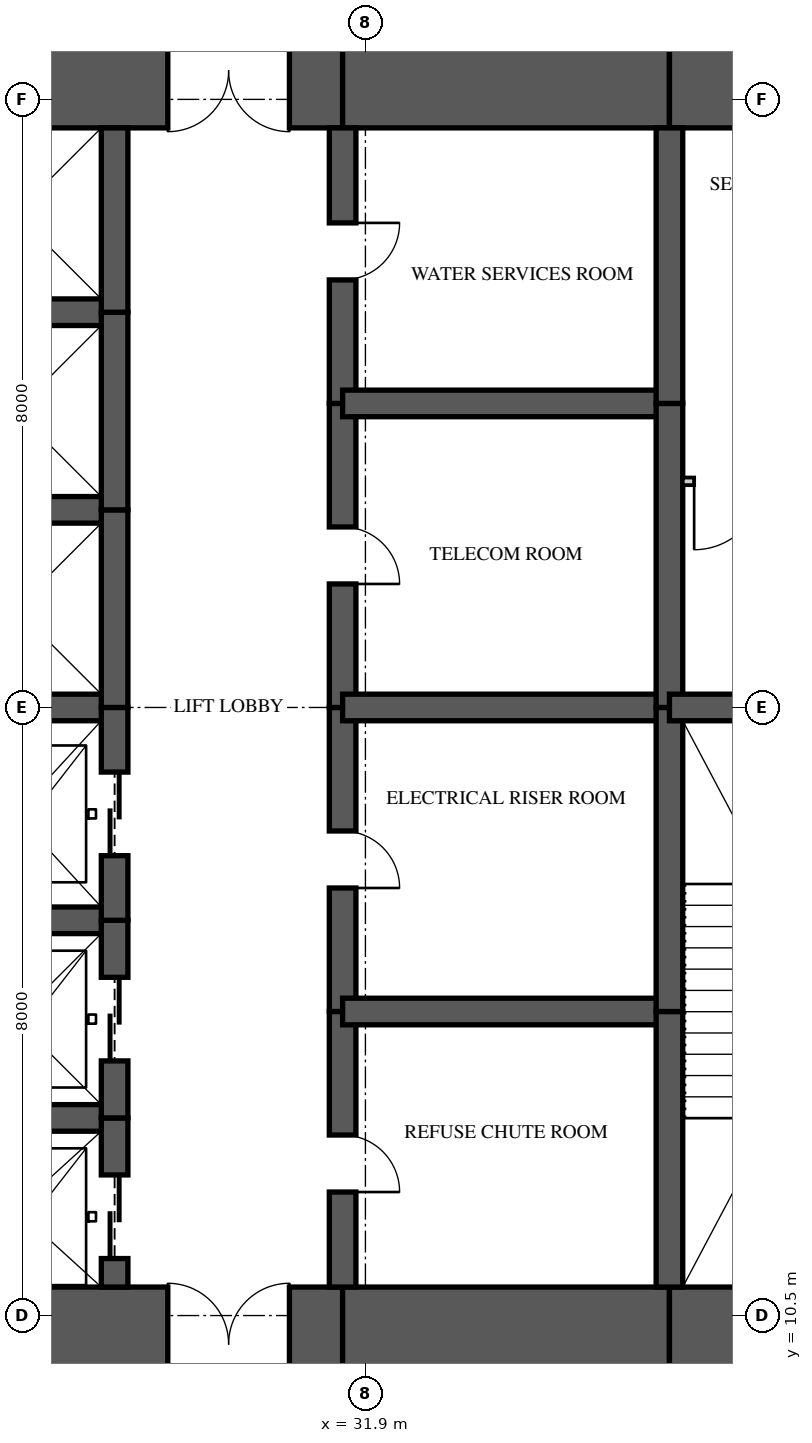
"""IFC4 building model, lengths in metres.
Left out: names, types, materials, properties, quantities, classifications, styles, units other than length and angle.
Written with IfcOpenShell. Run it as: python <this file> out.ifc"""

import sys

from ifc_helpers import new_model, si_unit, direction, frame, frame_2d, origin, place, context, subcontext, project, spatial, rectangle, extrude, element, fill, save


model = new_model("IFC4")
c1 = context("Model", 3, precision=1e-05, world=origin(), true_north=direction((0.0, 1.0)))
c2 = subcontext(c1, "Body", "Model", "MODEL_VIEW")
j1 = project(units=[si_unit("LENGTHUNIT", "METRE"), si_unit("PLANEANGLEUNIT", "RADIAN")], contexts=[c1])
p1 = place(None, origin())
s1 = spatial("IfcSite", under=j1, at=p1, CompositionType="ELEMENT")
p2 = place(p1, origin())
s2 = spatial("IfcBuilding", under=s1, at=p2, CompositionType="ELEMENT")
p3 = place(p2, frame((0.0, 0.0, 111.55)))
s3 = spatial("IfcBuildingStorey", under=s2, at=p3, CompositionType="ELEMENT", Elevation=111.55)
p4 = place(p3, frame((26.0, 10.125, 0.0), z_axis=(0.0, 0.0, 1.0), x_axis=(1.0, 0.0, 0.0)))
e1 = element("IfcWall", 1, at=p4, inside=s3, PredefinedType="SHEAR", context=c2, shape_type="SweptSolid", body=[
    extrude(rectangle(XDim=5.6, YDim=1.5, at=frame_2d((2.8, 0.0))), origin(), (0.0, 0.0, 1.0), 3.35),
])
p5 = place(p4, frame((3.3, 0.0, 0.0)))
e2 = element("IfcOpeningElement", 2, at=p5, cuts=e1, PredefinedType="OPENING", context=c2, shape_type="SweptSolid", body=[
    extrude(rectangle(XDim=1.6, YDim=2.1, at=frame_2d((0.8, 1.05))), frame((0.0, 0.76, 0.0), z_axis=(0.0, -1.0, 0.0), x_axis=(1.0, 0.0, 0.0)), (0.0, 0.0, 1.0), 1.52),
])
p6 = place(p3, frame((31.6, 10.125, 0.0), z_axis=(0.0, 0.0, 1.0), x_axis=(1.0, 0.0, 0.0)))
e3 = element("IfcWall", 3, at=p6, inside=s3, PredefinedType="SHEAR", context=c2, shape_type="SweptSolid", body=[
    extrude(rectangle(XDim=4.3, YDim=1.5, at=frame_2d((2.15, 0.0))), origin(), (0.0, 0.0, 1.0), 3.35),
])
p7 = place(p3, frame((35.9, 10.125, 0.0), z_axis=(0.0, 0.0, 1.0), x_axis=(1.0, 0.0, 0.0)))
e4 = element("IfcWall", 4, at=p7, inside=s3, PredefinedType="SHEAR", context=c2, shape_type="SweptSolid", body=[
    extrude(rectangle(XDim=8.325, YDim=1.5, at=frame_2d((4.163, 0.0))), origin(), (0.0, 0.0, 1.0), 3.35),
])
p8 = place(p7, frame((2.7, 0.0, 0.0)))
e5 = element("IfcOpeningElement", 5, at=p8, cuts=e4, PredefinedType="OPENING", context=c2, shape_type="SweptSolid", body=[
    extrude(rectangle(XDim=1.0, YDim=2.1, at=frame_2d((0.5, 1.05))), frame((0.0, 0.76, 0.0), z_axis=(0.0, -1.0, 0.0), x_axis=(1.0, 0.0, 0.0)), (0.0, 0.0, 1.0), 1.52),
])
p9 = place(p3, frame((44.225, 26.875, 0.0), z_axis=(0.0, 0.0, 1.0), x_axis=(-1.0, 0.0, 0.0)))
e6 = element("IfcWall", 6, at=p9, inside=s3, PredefinedType="SHEAR", context=c2, shape_type="SweptSolid", body=[
    extrude(rectangle(XDim=8.325, YDim=1.5, at=frame_2d((4.163, 0.0))), origin(), (0.0, 0.0, 1.0), 3.35),
])
p10 = place(p9, frame((5.725, 0.0, 0.0)))
e7 = element("IfcOpeningElement", 7, at=p10, cuts=e6, PredefinedType="OPENING", context=c2, shape_type="SweptSolid", body=[
    extrude(rectangle(XDim=0.9, YDim=2.1, at=frame_2d((0.45, 1.05))), frame((0.0, 0.76, 0.0), z_axis=(0.0, -1.0, 0.0), x_axis=(1.0, 0.0, 0.0)), (0.0, 0.0, 1.0), 1.52),
])
p11 = place(p3, frame((35.9, 26.875, 0.0), z_axis=(0.0, 0.0, 1.0), x_axis=(-1.0, 0.0, 0.0)))
e8 = element("IfcWall", 8, at=p11, inside=s3, PredefinedType="SHEAR", context=c2, shape_type="SweptSolid", body=[
    extrude(rectangle(XDim=4.3, YDim=1.5, at=frame_2d((2.15, 0.0))), origin(), (0.0, 0.0, 1.0), 3.35),
])
p12 = place(p3, frame((31.6, 26.875, 0.0), z_axis=(0.0, 0.0, 1.0), x_axis=(-1.0, 0.0, 0.0)))
e9 = element("IfcWall", 9, at=p12, inside=s3, PredefinedType="SHEAR", context=c2, shape_type="SweptSolid", body=[
    extrude(rectangle(XDim=5.6, YDim=1.5, at=frame_2d((2.8, 0.0))), origin(), (0.0, 0.0, 1.0), 3.35),
])
p13 = place(p12, frame((0.7, 0.0, 0.0)))
e10 = element("IfcOpeningElement", 10, at=p13, cuts=e9, PredefinedType="OPENING", context=c2, shape_type="SweptSolid", body=[
    extrude(rectangle(XDim=1.6, YDim=2.1, at=frame_2d((0.8, 1.05))), frame((0.0, 0.76, 0.0), z_axis=(0.0, -1.0, 0.0), x_axis=(1.0, 0.0, 0.0)), (0.0, 0.0, 1.0), 1.52),
])
p14 = place(p3, frame((28.6, 10.875, 0.0), z_axis=(0.0, 0.0, 1.0), x_axis=(0.0, 1.0, 0.0)))
e11 = element("IfcWall", 11, at=p14, inside=s3, PredefinedType="SHEAR", context=c2, shape_type="SweptSolid", body=[
    extrude(rectangle(XDim=2.225, YDim=0.35, at=frame_2d((1.113, 0.0))), origin(), (0.0, 0.0, 1.0), 3.35),
])
p15 = place(p14, frame((0.375, 0.0, 0.0)))
e12 = element("IfcOpeningElement", 12, at=p15, cuts=e11, PredefinedType="OPENING", context=c2, shape_type="SweptSolid", body=[
    extrude(rectangle(XDim=1.1, YDim=2.1, at=frame_2d((0.55, 1.05))), frame((0.0, 0.185, 0.0), z_axis=(0.0, -1.0, 0.0), x_axis=(1.0, 0.0, 0.0)), (0.0, 0.0, 1.0), 0.37),
])
p16 = place(p3, frame((28.6, 13.1, 0.0), z_axis=(0.0, 0.0, 1.0), x_axis=(0.0, 1.0, 0.0)))
e13 = element("IfcWall", 13, at=p16, inside=s3, PredefinedType="SHEAR", context=c2, shape_type="SweptSolid", body=[
    extrude(rectangle(XDim=2.6, YDim=0.35, at=frame_2d((1.3, 0.0))), origin(), (0.0, 0.0, 1.0), 3.35),
])
p17 = place(p16, frame((0.75, 0.0, 0.0)))
e14 = element("IfcOpeningElement", 14, at=p17, cuts=e13, PredefinedType="OPENING", context=c2, shape_type="SweptSolid", body=[
    extrude(rectangle(XDim=1.1, YDim=2.1, at=frame_2d((0.55, 1.05))), frame((0.0, 0.185, 0.0), z_axis=(0.0, -1.0, 0.0), x_axis=(1.0, 0.0, 0.0)), (0.0, 0.0, 1.0), 0.37),
])
p18 = place(p3, frame((28.6, 15.7, 0.0), z_axis=(0.0, 0.0, 1.0), x_axis=(0.0, 1.0, 0.0)))
e15 = element("IfcWall", 15, at=p18, inside=s3, PredefinedType="SHEAR", context=c2, shape_type="SweptSolid", body=[
    extrude(rectangle(XDim=2.8, YDim=0.35, at=frame_2d((1.4, 0.0))), origin(), (0.0, 0.0, 1.0), 3.35),
])
p19 = place(p18, frame((0.85, 0.0, 0.0)))
e16 = element("IfcOpeningElement", 16, at=p19, cuts=e15, PredefinedType="OPENING", context=c2, shape_type="SweptSolid", body=[
    extrude(rectangle(XDim=1.1, YDim=2.1, at=frame_2d((0.55, 1.05))), frame((0.0, 0.185, 0.0), z_axis=(0.0, -1.0, 0.0), x_axis=(1.0, 0.0, 0.0)), (0.0, 0.0, 1.0), 0.37),
])
p20 = place(p3, frame((28.6, 18.5, 0.0), z_axis=(0.0, 0.0, 1.0), x_axis=(0.0, 1.0, 0.0)))
e17 = element("IfcWall", 17, at=p20, inside=s3, PredefinedType="SHEAR", context=c2, shape_type="SweptSolid", body=[
    extrude(rectangle(XDim=2.6, YDim=0.35, at=frame_2d((1.3, 0.0))), origin(), (0.0, 0.0, 1.0), 3.35),
])
p21 = place(p3, frame((28.6, 21.1, 0.0), z_axis=(0.0, 0.0, 1.0), x_axis=(0.0, 1.0, 0.0)))
e18 = element("IfcWall", 18, at=p21, inside=s3, PredefinedType="SHEAR", context=c2, shape_type="SweptSolid", body=[
    extrude(rectangle(XDim=2.6, YDim=0.35, at=frame_2d((1.3, 0.0))), origin(), (0.0, 0.0, 1.0), 3.35),
])
p22 = place(p3, frame((28.6, 23.7, 0.0), z_axis=(0.0, 0.0, 1.0), x_axis=(0.0, 1.0, 0.0)))
e19 = element("IfcWall", 19, at=p22, inside=s3, PredefinedType="SHEAR", context=c2, shape_type="SweptSolid", body=[
    extrude(rectangle(XDim=2.425, YDim=0.35, at=frame_2d((1.212, 0.0))), origin(), (0.0, 0.0, 1.0), 3.35),
])
p23 = place(p3, frame((31.6, 10.875, 0.0), z_axis=(0.0, 0.0, 1.0), x_axis=(0.0, 1.0, 0.0)))
e20 = element("IfcWall", 20, at=p23, inside=s3, PredefinedType="SHEAR", context=c2, shape_type="SweptSolid", body=[
    extrude(rectangle(XDim=3.625, YDim=0.35, at=frame_2d((1.812, 0.0))), origin(), (0.0, 0.0, 1.0), 3.35),
])
p24 = place(p23, frame((1.25, 0.0, 0.0)))
e21 = element("IfcOpeningElement", 21, at=p24, cuts=e20, PredefinedType="OPENING", context=c2, shape_type="SweptSolid", body=[
    extrude(rectangle(XDim=0.75, YDim=2.1, at=frame_2d((0.375, 1.05))), frame((0.0, 0.185, 0.0), z_axis=(0.0, -1.0, 0.0), x_axis=(1.0, 0.0, 0.0)), (0.0, 0.0, 1.0), 0.37),
])
p25 = place(p3, frame((31.6, 14.5, 0.0), z_axis=(0.0, 0.0, 1.0), x_axis=(0.0, 1.0, 0.0)))
e22 = element("IfcWall", 22, at=p25, inside=s3, PredefinedType="SHEAR", context=c2, shape_type="SweptSolid", body=[
    extrude(rectangle(XDim=4.0, YDim=0.35, at=frame_2d((2.0, 0.0))), origin(), (0.0, 0.0, 1.0), 3.35),
])
p26 = place(p25, frame((1.625, 0.0, 0.0)))
e23 = element("IfcOpeningElement", 23, at=p26, cuts=e22, PredefinedType="OPENING", context=c2, shape_type="SweptSolid", body=[
    extrude(rectangle(XDim=0.75, YDim=2.1, at=frame_2d((0.375, 1.05))), frame((0.0, 0.185, 0.0), z_axis=(0.0, -1.0, 0.0), x_axis=(1.0, 0.0, 0.0)), (0.0, 0.0, 1.0), 0.37),
])
p27 = place(p3, frame((31.6, 18.5, 0.0), z_axis=(0.0, 0.0, 1.0), x_axis=(0.0, 1.0, 0.0)))
e24 = element("IfcWall", 24, at=p27, inside=s3, PredefinedType="SHEAR", context=c2, shape_type="SweptSolid", body=[
    extrude(rectangle(XDim=4.0, YDim=0.35, at=frame_2d((2.0, 0.0))), origin(), (0.0, 0.0, 1.0), 3.35),
])
p28 = place(p27, frame((1.625, 0.0, 0.0)))
e25 = element("IfcOpeningElement", 25, at=p28, cuts=e24, PredefinedType="OPENING", context=c2, shape_type="SweptSolid", body=[
    extrude(rectangle(XDim=0.75, YDim=2.1, at=frame_2d((0.375, 1.05))), frame((0.0, 0.185, 0.0), z_axis=(0.0, -1.0, 0.0), x_axis=(1.0, 0.0, 0.0)), (0.0, 0.0, 1.0), 0.37),
])
p29 = place(p3, frame((31.6, 22.5, 0.0), z_axis=(0.0, 0.0, 1.0), x_axis=(0.0, 1.0, 0.0)))
e26 = element("IfcWall", 26, at=p29, inside=s3, PredefinedType="SHEAR", context=c2, shape_type="SweptSolid", body=[
    extrude(rectangle(XDim=3.625, YDim=0.35, at=frame_2d((1.812, 0.0))), origin(), (0.0, 0.0, 1.0), 3.35),
])
p30 = place(p29, frame((1.625, 0.0, 0.0)))
e27 = element("IfcOpeningElement", 27, at=p30, cuts=e26, PredefinedType="OPENING", context=c2, shape_type="SweptSolid", body=[
    extrude(rectangle(XDim=0.75, YDim=2.1, at=frame_2d((0.375, 1.05))), frame((0.0, 0.185, 0.0), z_axis=(0.0, -1.0, 0.0), x_axis=(1.0, 0.0, 0.0)), (0.0, 0.0, 1.0), 0.37),
])
p31 = place(p3, frame((35.9, 10.875, 0.0), z_axis=(0.0, 0.0, 1.0), x_axis=(0.0, 1.0, 0.0)))
e28 = element("IfcWall", 28, at=p31, inside=s3, PredefinedType="SHEAR", context=c2, shape_type="SweptSolid", body=[
    extrude(rectangle(XDim=3.625, YDim=0.35, at=frame_2d((1.812, 0.0))), origin(), (0.0, 0.0, 1.0), 3.35),
])
for number, where, z_axis, x_axis in (
    (29, (35.9, 14.5, 0.0), (0.0, 0.0, 1.0), (0.0, 1.0, 0.0)),
    (30, (35.9, 18.5, 0.0), (0.0, 0.0, 1.0), (0.0, 1.0, 0.0)),
):
    element("IfcWall", number, at=place(p3, frame(where, z_axis=z_axis, x_axis=x_axis)), inside=s3, PredefinedType="SHEAR", context=c2, shape_type="SweptSolid", body=[
        extrude(rectangle(XDim=4.0, YDim=0.35, at=frame_2d((2.0, 0.0))), origin(), (0.0, 0.0, 1.0), 3.35),
    ])
p32 = place(p3, frame((35.9, 22.5, 0.0), z_axis=(0.0, 0.0, 1.0), x_axis=(0.0, 1.0, 0.0)))
e31 = element("IfcWall", 31, at=p32, inside=s3, PredefinedType="SHEAR", context=c2, shape_type="SweptSolid", body=[
    extrude(rectangle(XDim=3.625, YDim=0.35, at=frame_2d((1.812, 0.0))), origin(), (0.0, 0.0, 1.0), 3.35),
])
for number, where, z_axis, x_axis in (
    (32, (26.0, 13.1, 0.0), (0.0, 0.0, 1.0), (1.0, 0.0, 0.0)),
    (33, (26.0, 15.7, 0.0), (0.0, 0.0, 1.0), (1.0, 0.0, 0.0)),
    (34, (26.0, 18.5, 0.0), (0.0, 0.0, 1.0), (1.0, 0.0, 0.0)),
    (35, (26.0, 21.1, 0.0), (0.0, 0.0, 1.0), (1.0, 0.0, 0.0)),
    (36, (26.0, 23.7, 0.0), (0.0, 0.0, 1.0), (1.0, 0.0, 0.0)),
):
    element("IfcWall", number, at=place(p3, frame(where, z_axis=z_axis, x_axis=x_axis)), inside=s3, PredefinedType="SHEAR", context=c2, shape_type="SweptSolid", body=[
        extrude(rectangle(XDim=2.6, YDim=0.35, at=frame_2d((1.3, 0.0))), origin(), (0.0, 0.0, 1.0), 3.35),
    ])
for number, where, z_axis, x_axis in (
    (37, (31.6, 14.5, 0.0), (0.0, 0.0, 1.0), (1.0, 0.0, 0.0)),
    (38, (31.6, 18.5, 0.0), (0.0, 0.0, 1.0), (1.0, 0.0, 0.0)),
    (39, (31.6, 22.5, 0.0), (0.0, 0.0, 1.0), (1.0, 0.0, 0.0)),
):
    element("IfcWall", number, at=place(p3, frame(where, z_axis=z_axis, x_axis=x_axis)), inside=s3, PredefinedType="SHEAR", context=c2, shape_type="SweptSolid", body=[
        extrude(rectangle(XDim=4.3, YDim=0.35, at=frame_2d((2.15, 0.0))), origin(), (0.0, 0.0, 1.0), 3.35),
    ])
p33 = place(p3, frame((35.9, 18.5, 0.0), z_axis=(0.0, 0.0, 1.0), x_axis=(1.0, 0.0, 0.0)))
e40 = element("IfcWall", 40, at=p33, inside=s3, PredefinedType="SHEAR", context=c2, shape_type="SweptSolid", body=[
    extrude(rectangle(XDim=4.3, YDim=0.35, at=frame_2d((2.15, 0.0))), origin(), (0.0, 0.0, 1.0), 3.35),
])
p34 = place(p3, frame((36.075, 21.475, 0.0), z_axis=(0.0, 0.0, 1.0), x_axis=(1.0, 0.0, 0.0)))
e41 = element("IfcWall", 41, at=p34, inside=s3, PredefinedType="PARTITIONING", context=c2, shape_type="SweptSolid", body=[
    extrude(rectangle(XDim=3.95, YDim=0.1, at=frame_2d((1.975, 0.0))), origin(), (0.0, 0.0, 1.0), 3.11),
])
p35 = place(p34, frame((0.15, 0.0, 0.0)))
e42 = element("IfcOpeningElement", 42, at=p35, cuts=e41, PredefinedType="OPENING", context=c2, shape_type="SweptSolid", body=[
    extrude(rectangle(XDim=0.9, YDim=2.1, at=frame_2d((0.45, 1.05))), frame((0.0, 0.06, 0.0), z_axis=(0.0, -1.0, 0.0), x_axis=(1.0, 0.0, 0.0)), (0.0, 0.0, 1.0), 0.12),
])
p36 = place(p35, frame((0.9, 0.0, 0.0), z_axis=(0.0, 0.0, 1.0), x_axis=(-1.0, 0.0, 0.0)))
e43 = element("IfcDoor", 43, at=p36, inside=s3, OperationType="SINGLE_SWING_RIGHT", PredefinedType="DOOR", context=c2, shape_type="SweptSolid", body=[
    extrude(rectangle(XDim=0.9, YDim=2.1, at=frame_2d((0.45, 1.05))), frame((0.0, 0.025, 0.0), z_axis=(0.0, -1.0, 0.0), x_axis=(1.0, 0.0, 0.0)), (0.0, 0.0, 1.0), 0.05),
])
fill(e42, e43)
p37 = place(p15, origin())
e44 = element("IfcDoor", 44, at=p37, inside=s3, OperationType="SLIDING_TO_LEFT", PredefinedType="DOOR", context=c2, shape_type="SweptSolid", body=[
    extrude(rectangle(XDim=1.1, YDim=2.1, at=frame_2d((0.55, 1.05))), frame((0.0, 0.025, 0.0), z_axis=(0.0, -1.0, 0.0), x_axis=(1.0, 0.0, 0.0)), (0.0, 0.0, 1.0), 0.05),
])
fill(e12, e44)
p38 = place(p17, origin())
e45 = element("IfcDoor", 45, at=p38, inside=s3, OperationType="SLIDING_TO_LEFT", PredefinedType="DOOR", context=c2, shape_type="SweptSolid", body=[
    extrude(rectangle(XDim=1.1, YDim=2.1, at=frame_2d((0.55, 1.05))), frame((0.0, 0.025, 0.0), z_axis=(0.0, -1.0, 0.0), x_axis=(1.0, 0.0, 0.0)), (0.0, 0.0, 1.0), 0.05),
])
fill(e14, e45)
p39 = place(p19, origin())
e46 = element("IfcDoor", 46, at=p39, inside=s3, OperationType="SLIDING_TO_LEFT", PredefinedType="DOOR", context=c2, shape_type="SweptSolid", body=[
    extrude(rectangle(XDim=1.1, YDim=2.1, at=frame_2d((0.55, 1.05))), frame((0.0, 0.025, 0.0), z_axis=(0.0, -1.0, 0.0), x_axis=(1.0, 0.0, 0.0)), (0.0, 0.0, 1.0), 0.05),
])
fill(e16, e46)
p40 = place(p5, origin())
e47 = element("IfcDoor", 47, at=p40, inside=s3, OperationType="DOUBLE_DOOR_SINGLE_SWING", PredefinedType="DOOR", context=c2, shape_type="SweptSolid", body=[
    extrude(rectangle(XDim=1.6, YDim=2.1, at=frame_2d((0.8, 1.05))), frame((0.0, 0.025, 0.0), z_axis=(0.0, -1.0, 0.0), x_axis=(1.0, 0.0, 0.0)), (0.0, 0.0, 1.0), 0.05),
])
fill(e2, e47)
p41 = place(p13, origin())
e48 = element("IfcDoor", 48, at=p41, inside=s3, OperationType="DOUBLE_DOOR_SINGLE_SWING", PredefinedType="DOOR", context=c2, shape_type="SweptSolid", body=[
    extrude(rectangle(XDim=1.6, YDim=2.1, at=frame_2d((0.8, 1.05))), frame((0.0, 0.025, 0.0), z_axis=(0.0, -1.0, 0.0), x_axis=(1.0, 0.0, 0.0)), (0.0, 0.0, 1.0), 0.05),
])
fill(e10, e48)
p42 = place(p24, frame((0.75, 0.0, 0.0), z_axis=(0.0, 0.0, 1.0), x_axis=(-1.0, 0.0, 0.0)))
e49 = element("IfcDoor", 49, at=p42, inside=s3, OperationType="SINGLE_SWING_RIGHT", PredefinedType="DOOR", context=c2, shape_type="SweptSolid", body=[
    extrude(rectangle(XDim=0.75, YDim=2.1, at=frame_2d((0.375, 1.05))), frame((0.0, 0.025, 0.0), z_axis=(0.0, -1.0, 0.0), x_axis=(1.0, 0.0, 0.0)), (0.0, 0.0, 1.0), 0.05),
])
fill(e21, e49)
p43 = place(p26, frame((0.75, 0.0, 0.0), z_axis=(0.0, 0.0, 1.0), x_axis=(-1.0, 0.0, 0.0)))
e50 = element("IfcDoor", 50, at=p43, inside=s3, OperationType="SINGLE_SWING_RIGHT", PredefinedType="DOOR", context=c2, shape_type="SweptSolid", body=[
    extrude(rectangle(XDim=0.75, YDim=2.1, at=frame_2d((0.375, 1.05))), frame((0.0, 0.025, 0.0), z_axis=(0.0, -1.0, 0.0), x_axis=(1.0, 0.0, 0.0)), (0.0, 0.0, 1.0), 0.05),
])
fill(e23, e50)
p44 = place(p28, frame((0.75, 0.0, 0.0), z_axis=(0.0, 0.0, 1.0), x_axis=(-1.0, 0.0, 0.0)))
e51 = element("IfcDoor", 51, at=p44, inside=s3, OperationType="SINGLE_SWING_RIGHT", PredefinedType="DOOR", context=c2, shape_type="SweptSolid", body=[
    extrude(rectangle(XDim=0.75, YDim=2.1, at=frame_2d((0.375, 1.05))), frame((0.0, 0.025, 0.0), z_axis=(0.0, -1.0, 0.0), x_axis=(1.0, 0.0, 0.0)), (0.0, 0.0, 1.0), 0.05),
])
fill(e25, e51)
p45 = place(p30, frame((0.75, 0.0, 0.0), z_axis=(0.0, 0.0, 1.0), x_axis=(-1.0, 0.0, 0.0)))
e52 = element("IfcDoor", 52, at=p45, inside=s3, OperationType="SINGLE_SWING_LEFT", PredefinedType="DOOR", context=c2, shape_type="SweptSolid", body=[
    extrude(rectangle(XDim=0.75, YDim=2.1, at=frame_2d((0.375, 1.05))), frame((0.0, 0.025, 0.0), z_axis=(0.0, -1.0, 0.0), x_axis=(1.0, 0.0, 0.0)), (0.0, 0.0, 1.0), 0.05),
])
fill(e27, e52)
save(model, sys.argv[1])
